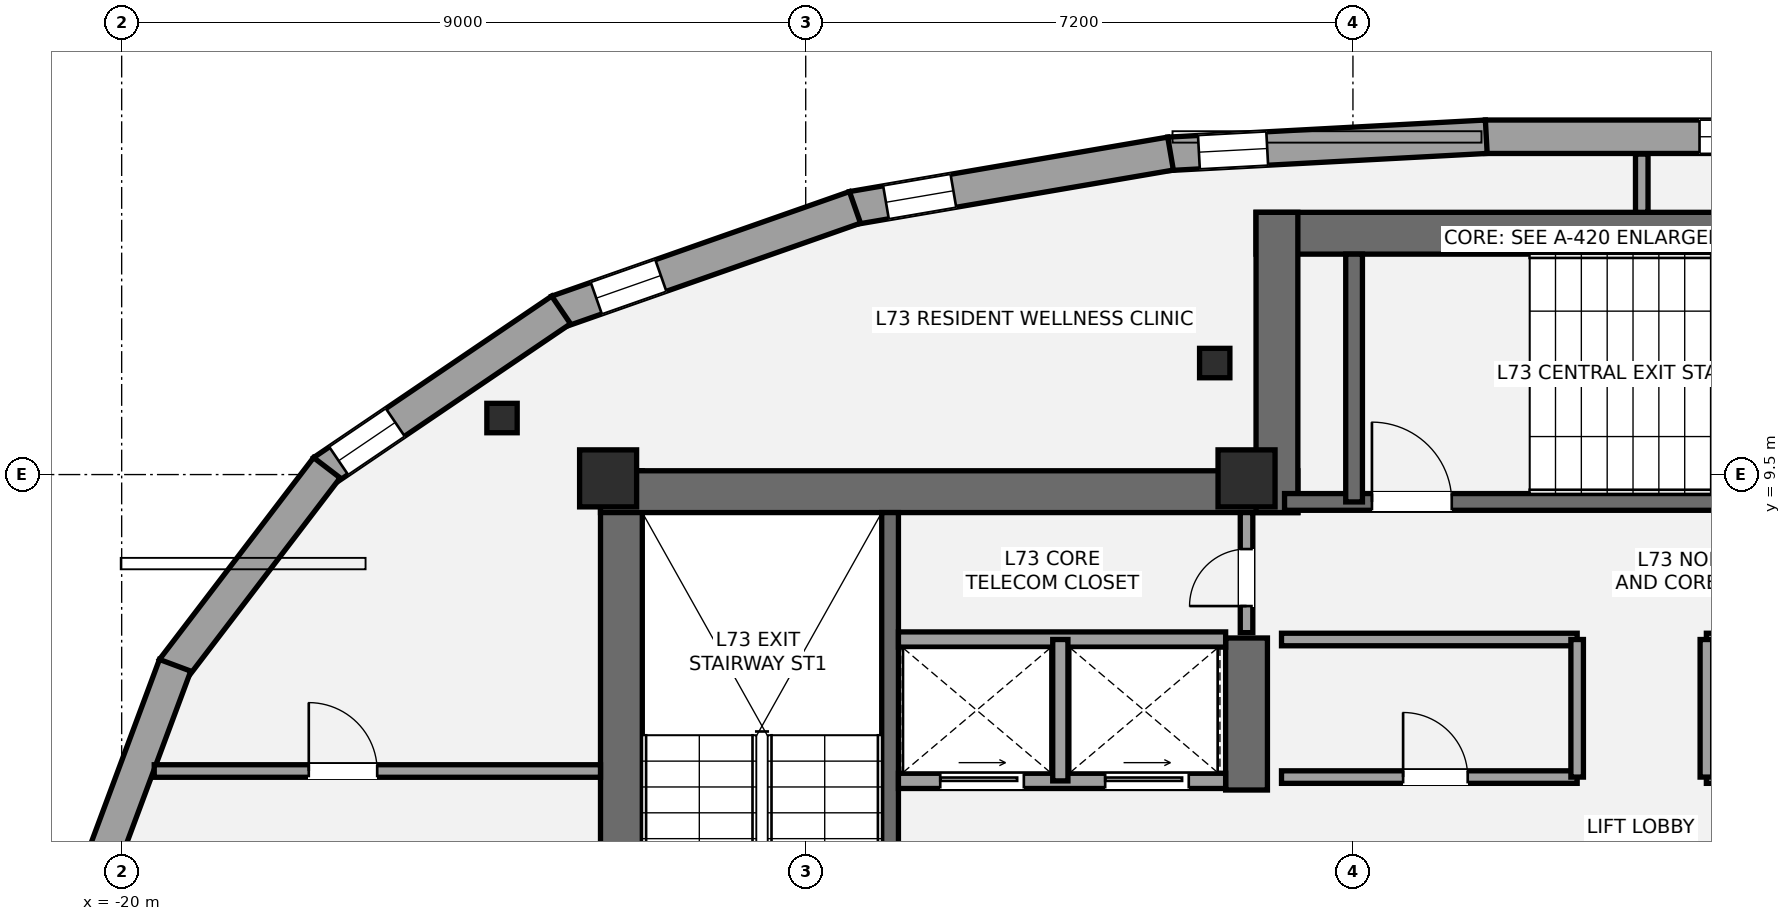
"""IFC4 building model, lengths in metres.
Left out: names, types, materials, properties, quantities, classifications, styles, units other than length and angle.
Written with IfcOpenShell. Run it as: python <this file> out.ifc"""

import sys

from ifc_helpers import new_model, si_unit, direction, frame, frame_2d, origin, origin_2d, place, context, subcontext, project, spatial, rectangle, i_section, extrude, element, fill, save


model = new_model("IFC4")
c1 = context("Model", 3, precision=1e-05, world=origin(), true_north=direction((0.0, 1.0)))
c2 = subcontext(c1, "Body", "Model", "MODEL_VIEW")
j1 = project(units=[si_unit("LENGTHUNIT", "METRE"), si_unit("PLANEANGLEUNIT", "RADIAN")], contexts=[c1])
p1 = place(None, origin())
s1 = spatial("IfcSite", under=j1, at=p1, CompositionType="ELEMENT")
p2 = place(p1, origin())
s2 = spatial("IfcBuilding", under=s1, at=p2, CompositionType="ELEMENT")
p3 = place(p2, frame((0.0, 0.0, 257.25)))
s3 = spatial("IfcBuildingStorey", under=s2, at=p3, CompositionType="ELEMENT", Elevation=257.25)
p4 = place(p3, frame((-13.425, 1.3, 0.0), z_axis=(0.0, 0.0, 1.0), x_axis=(0.0, 1.0, 0.0)))
e1 = element("IfcWall", 1, at=p4, inside=s3, PredefinedType="SHEAR", context=c2, shape_type="SweptSolid", body=[
    extrude(rectangle(XDim=8.25, YDim=0.55, at=frame_2d((4.125, 0.0))), origin(), (0.0, 0.0, 1.0), 3.15),
])
p5 = place(p3, frame((-13.7, 9.275, 0.0), z_axis=(0.0, 0.0, 1.0), x_axis=(1.0, 0.0, 0.0)))
e2 = element("IfcWall", 2, at=p5, inside=s3, PredefinedType="SHEAR", context=c2, shape_type="SweptSolid", body=[
    extrude(rectangle(XDim=9.175, YDim=0.55, at=frame_2d((4.587, 0.0))), origin(), (0.0, 0.0, 1.0), 3.15),
])
p6 = place(p3, frame((-5.2, 5.35, 0.0), z_axis=(0.0, 0.0, 1.0), x_axis=(0.0, 1.0, 0.0)))
e3 = element("IfcWall", 3, at=p6, inside=s3, PredefinedType="SHEAR", context=c2, shape_type="SweptSolid", body=[
    extrude(rectangle(XDim=2.0, YDim=0.55, at=frame_2d((1.0, 0.0))), origin(), (0.0, 0.0, 1.0), 3.15),
])
p7 = place(p3, frame((-9.89, 1.85, 0.0), z_axis=(0.0, 0.0, 1.0), x_axis=(0.0, 1.0, 0.0)))
e4 = element("IfcWall", 4, at=p7, inside=s3, PredefinedType="SHEAR", context=c2, shape_type="SweptSolid", body=[
    extrude(rectangle(XDim=7.15, YDim=0.22, at=frame_2d((3.575, 0.0))), origin(), (0.0, 0.0, 1.0), 3.15),
])
p8 = place(p3, frame((-5.075, 12.675, 0.0), z_axis=(0.0, 0.0, 1.0), x_axis=(1.0, 0.0, 0.0)))
e5 = element("IfcWall", 5, at=p8, inside=s3, PredefinedType="SHEAR", context=c2, shape_type="SweptSolid", body=[
    extrude(rectangle(XDim=10.15, YDim=0.55, at=frame_2d((5.075, 0.0))), origin(), (0.0, 0.0, 1.0), 3.15),
])
p9 = place(p3, frame((-4.8, 9.0, 0.0), z_axis=(0.0, 0.0, 1.0), x_axis=(0.0, 1.0, 0.0)))
e6 = element("IfcWall", 6, at=p9, inside=s3, PredefinedType="SHEAR", context=c2, shape_type="SweptSolid", body=[
    extrude(rectangle(XDim=3.95, YDim=0.55, at=frame_2d((1.975, 0.0))), origin(), (0.0, 0.0, 1.0), 3.15),
])
p10 = place(p3, frame((-4.7, 9.14, 0.0), z_axis=(0.0, 0.0, 1.0), x_axis=(1.0, 0.0, 0.0)))
e7 = element("IfcWall", 7, at=p10, inside=s3, PredefinedType="SHEAR", context=c2, shape_type="SweptSolid", body=[
    extrude(rectangle(XDim=9.3, YDim=0.22, at=frame_2d((4.65, 0.0))), origin(), (0.0, 0.0, 1.0), 3.15),
])
p11 = place(p10, frame((1.15, 0.0, 0.0)))
e8 = element("IfcOpeningElement", 8, at=p11, cuts=e7, PredefinedType="OPENING", context=c2, shape_type="SweptSolid", body=[
    extrude(rectangle(XDim=1.05, YDim=2.15, at=frame_2d((0.525, 1.075))), frame((0.0, 0.12, 0.0), z_axis=(0.0, -1.0, 0.0), x_axis=(1.0, 0.0, 0.0)), (0.0, 0.0, 1.0), 0.24),
])
p12 = place(p3, frame((-3.785, 9.14, 0.0), z_axis=(0.0, 0.0, 1.0), x_axis=(0.0, 1.0, 0.0)))
e9 = element("IfcWall", 9, at=p12, inside=s3, PredefinedType="SHEAR", context=c2, shape_type="SweptSolid", body=[
    extrude(rectangle(XDim=3.26, YDim=0.22, at=frame_2d((1.63, 0.0))), origin(), (0.0, 0.0, 1.0), 3.15),
])
for number, where, z_axis, x_axis in (
    (10, (-13.6, 9.45, 0.0), (0.0, 0.0, 1.0), (1.0, 0.0, 0.0)),
    (11, (-5.2, 9.45, 0.0), (0.0, 0.0, 1.0), (1.0, 0.0, 0.0)),
):
    element("IfcColumn", number, at=place(p3, frame(where, z_axis=z_axis, x_axis=x_axis)), inside=s3, PredefinedType="PILASTER", context=c2, shape_type="SweptSolid", body=[
        extrude(rectangle(XDim=0.75, YDim=0.75, at=origin_2d()), origin(), (0.0, 0.0, 1.0), 3.15),
    ])
for number, where, z_axis, x_axis in (
    (12, (-5.619, 10.967, 0.0), (0.0, 0.0, 1.0), (1.0, 0.0, 0.0)),
    (13, (-14.996, 10.244, 0.0), (0.0, 0.0, 1.0), (1.0, 0.0, 0.0)),
):
    element("IfcColumn", number, at=place(p3, frame(where, z_axis=z_axis, x_axis=x_axis)), inside=s3, PredefinedType="COLUMN", context=c2, shape_type="SweptSolid", body=[
        extrude(i_section(OverallWidth=0.399, OverallDepth=0.387, WebThickness=0.021, FlangeThickness=0.033, at=origin_2d()), origin(), (0.0, 0.0, 1.0), 3.15),
    ])
p13 = place(p3, frame((-2.058, 13.944, 0.0), z_axis=(0.0, 0.0, 1.0), x_axis=(1.0, 0.0, 0.0)))
e14 = element("IfcWall", 14, at=p13, inside=s3, PredefinedType="STANDARD", context=c2, shape_type="SweptSolid", body=[
    extrude(rectangle(XDim=4.115, YDim=0.44, at=frame_2d((2.058, 0.0))), origin(), (0.0, 0.0, 1.0), 2.296),
])
p14 = place(p13, frame((2.818, 0.0, 0.58)))
e15 = element("IfcOpeningElement", 15, at=p14, cuts=e14, PredefinedType="OPENING", context=c2, shape_type="SweptSolid", body=[
    extrude(rectangle(XDim=0.9, YDim=1.35, at=frame_2d((0.45, 0.675))), frame((0.0, 0.23, 0.0), z_axis=(0.0, -1.0, 0.0), x_axis=(1.0, 0.0, 0.0)), (0.0, 0.0, 1.0), 0.46),
])
p15 = place(p3, frame((-6.225, 13.72, 0.0), z_axis=(0.0, 0.0, 1.0), x_axis=(0.998558880418, 0.053667143941, 0.0)))
e16 = element("IfcWall", 16, at=p15, inside=s3, PredefinedType="STANDARD", context=c2, shape_type="SweptSolid", body=[
    extrude(rectangle(XDim=4.185, YDim=0.44, at=frame_2d((2.093, 0.0))), origin(), (0.0, 0.0, 1.0), 2.296),
])
p16 = place(p15, frame((0.399, 0.0, 0.58)))
e17 = element("IfcOpeningElement", 17, at=p16, cuts=e16, PredefinedType="OPENING", context=c2, shape_type="SweptSolid", body=[
    extrude(rectangle(XDim=0.9, YDim=1.35, at=frame_2d((0.45, 0.675))), frame((0.0, 0.23, 0.0), z_axis=(0.0, -1.0, 0.0), x_axis=(1.0, 0.0, 0.0)), (0.0, 0.0, 1.0), 0.46),
])
p17 = place(p3, frame((-10.388, 13.006, 0.0), z_axis=(0.0, 0.0, 1.0), x_axis=(0.985667057966, 0.168702254995, 0.0)))
e18 = element("IfcWall", 18, at=p17, inside=s3, PredefinedType="STANDARD", context=c2, shape_type="SweptSolid", body=[
    extrude(rectangle(XDim=4.249, YDim=0.44, at=frame_2d((2.125, 0.0))), origin(), (0.0, 0.0, 1.0), 2.296),
])
p18 = place(p17, frame((0.45, 0.0, 0.58)))
e19 = element("IfcOpeningElement", 19, at=p18, cuts=e18, PredefinedType="OPENING", context=c2, shape_type="SweptSolid", body=[
    extrude(rectangle(XDim=0.9, YDim=1.35, at=frame_2d((0.45, 0.675))), frame((0.0, 0.23, 0.0), z_axis=(0.0, -1.0, 0.0), x_axis=(1.0, 0.0, 0.0)), (0.0, 0.0, 1.0), 0.46),
])
p19 = place(p3, frame((-14.269, 11.64, 0.0), z_axis=(0.0, 0.0, 1.0), x_axis=(0.943571934891, 0.331167636834, 0.0)))
e20 = element("IfcWall", 20, at=p19, inside=s3, PredefinedType="STANDARD", context=c2, shape_type="SweptSolid", body=[
    extrude(rectangle(XDim=4.151, YDim=0.44, at=frame_2d((2.076, 0.0))), origin(), (0.0, 0.0, 1.0), 2.296),
])
p20 = place(p19, frame((0.544, 0.0, 0.58)))
e21 = element("IfcOpeningElement", 21, at=p20, cuts=e20, PredefinedType="OPENING", context=c2, shape_type="SweptSolid", body=[
    extrude(rectangle(XDim=0.9, YDim=1.35, at=frame_2d((0.45, 0.675))), frame((0.0, 0.23, 0.0), z_axis=(0.0, -1.0, 0.0), x_axis=(1.0, 0.0, 0.0)), (0.0, 0.0, 1.0), 0.46),
])
p21 = place(p3, frame((-17.352, 9.541, 0.0), z_axis=(0.0, 0.0, 1.0), x_axis=(0.827669406477, 0.561215959842, 0.0)))
e22 = element("IfcWall", 22, at=p21, inside=s3, PredefinedType="STANDARD", context=c2, shape_type="SweptSolid", body=[
    extrude(rectangle(XDim=3.786, YDim=0.44, at=frame_2d((1.893, 0.0))), origin(), (0.0, 0.0, 1.0), 2.296),
])
p22 = place(p21, frame((0.25, 0.0, 0.58)))
e23 = element("IfcOpeningElement", 23, at=p22, cuts=e22, PredefinedType="OPENING", context=c2, shape_type="SweptSolid", body=[
    extrude(rectangle(XDim=0.9, YDim=1.35, at=frame_2d((0.45, 0.675))), frame((0.0, 0.23, 0.0), z_axis=(0.0, -1.0, 0.0), x_axis=(1.0, 0.0, 0.0)), (0.0, 0.0, 1.0), 0.46),
])
p23 = place(p3, frame((-19.328, 6.934, 0.0), z_axis=(0.0, 0.0, 1.0), x_axis=(0.606828844818, 0.794832531479, 0.0)))
e24 = element("IfcWall", 24, at=p23, inside=s3, PredefinedType="STANDARD", context=c2, shape_type="SweptSolid", body=[
    extrude(rectangle(XDim=3.341, YDim=0.44, at=frame_2d((1.671, 0.0))), origin(), (0.0, 0.0, 1.0), 2.296),
])
p24 = place(p3, frame((-20.354, 4.152, 0.0), z_axis=(0.0, 0.0, 1.0), x_axis=(0.34898554078, 0.937128108813, 0.0)))
e25 = element("IfcWall", 25, at=p24, inside=s3, PredefinedType="STANDARD", context=c2, shape_type="SweptSolid", body=[
    extrude(rectangle(XDim=3.03, YDim=0.44, at=frame_2d((1.515, 0.0))), origin(), (0.0, 0.0, 1.0), 2.296),
])
p25 = place(p3, frame((-9.78, 5.47, 0.0), z_axis=(0.0, 0.0, 1.0), x_axis=(1.0, 0.0, 0.0)))
e26 = element("IfcWall", 26, at=p25, inside=s3, PredefinedType="SOLIDWALL", context=c2, shape_type="SweptSolid", body=[
    extrude(rectangle(XDim=4.305, YDim=0.2, at=frame_2d((2.152, 0.0))), origin(), (0.0, 0.0, 1.0), 2.93),
])
p26 = place(p25, frame((0.55, 0.0, 0.0)))
e27 = element("IfcOpeningElement", 27, at=p26, cuts=e26, PredefinedType="OPENING", context=c2, shape_type="SweptSolid", body=[
    extrude(rectangle(XDim=1.1, YDim=2.2, at=frame_2d((0.55, 1.1))), frame((0.0, 0.11, 0.0), z_axis=(0.0, -1.0, 0.0), x_axis=(1.0, 0.0, 0.0)), (0.0, 0.0, 1.0), 0.22),
])
p27 = place(p25, frame((2.72, 0.0, 0.0)))
e28 = element("IfcOpeningElement", 28, at=p27, cuts=e26, PredefinedType="OPENING", context=c2, shape_type="SweptSolid", body=[
    extrude(rectangle(XDim=1.1, YDim=2.2, at=frame_2d((0.55, 1.1))), frame((0.0, 0.11, 0.0), z_axis=(0.0, -1.0, 0.0), x_axis=(1.0, 0.0, 0.0)), (0.0, 0.0, 1.0), 0.22),
])
p28 = place(p3, frame((-9.78, 7.33, 0.0), z_axis=(0.0, 0.0, 1.0), x_axis=(1.0, 0.0, 0.0)))
e29 = element("IfcWall", 29, at=p28, inside=s3, PredefinedType="SOLIDWALL", context=c2, shape_type="SweptSolid", body=[
    extrude(rectangle(XDim=4.305, YDim=0.2, at=frame_2d((2.152, 0.0))), origin(), (0.0, 0.0, 1.0), 2.93),
])
p29 = place(p3, frame((-7.65, 5.47, 0.0), z_axis=(0.0, 0.0, 1.0), x_axis=(0.0, 1.0, 0.0)))
e30 = element("IfcWall", 30, at=p29, inside=s3, PredefinedType="SOLIDWALL", context=c2, shape_type="SweptSolid", body=[
    extrude(rectangle(XDim=1.86, YDim=0.2, at=frame_2d((0.93, 0.0))), origin(), (0.0, 0.0, 1.0), 2.93),
])
p30 = place(p3, frame((-4.74, 5.52, 0.0), z_axis=(0.0, 0.0, 1.0), x_axis=(1.0, 0.0, 0.0)))
e31 = element("IfcWall", 31, at=p30, inside=s3, PredefinedType="PARTITIONING", context=c2, shape_type="SweptSolid", body=[
    extrude(rectangle(XDim=3.89, YDim=0.165, at=frame_2d((1.945, 0.0))), origin(), (0.0, 0.0, 1.0), 2.93),
])
p31 = place(p30, frame((1.6, 0.0, 0.0)))
e32 = element("IfcOpeningElement", 32, at=p31, cuts=e31, PredefinedType="OPENING", context=c2, shape_type="SweptSolid", body=[
    extrude(rectangle(XDim=0.85, YDim=2.1, at=frame_2d((0.425, 1.05))), frame((0.0, 0.093, 0.0), z_axis=(0.0, -1.0, 0.0), x_axis=(1.0, 0.0, 0.0)), (0.0, 0.0, 1.0), 0.185),
])
p32 = place(p3, frame((-4.74, 7.33, 0.0), z_axis=(0.0, 0.0, 1.0), x_axis=(1.0, 0.0, 0.0)))
e33 = element("IfcWall", 33, at=p32, inside=s3, PredefinedType="PARTITIONING", context=c2, shape_type="SweptSolid", body=[
    extrude(rectangle(XDim=3.89, YDim=0.165, at=frame_2d((1.945, 0.0))), origin(), (0.0, 0.0, 1.0), 2.93),
])
p33 = place(p3, frame((-0.85, 5.52, 0.0), z_axis=(0.0, 0.0, 1.0), x_axis=(0.0, 1.0, 0.0)))
e34 = element("IfcWall", 34, at=p33, inside=s3, PredefinedType="PARTITIONING", context=c2, shape_type="SweptSolid", body=[
    extrude(rectangle(XDim=1.81, YDim=0.165, at=frame_2d((0.905, 0.0))), origin(), (0.0, 0.0, 1.0), 2.93),
])
p34 = place(p3, frame((0.85, 5.52, 0.0), z_axis=(0.0, 0.0, 1.0), x_axis=(1.0, 0.0, 0.0)))
e35 = element("IfcWall", 35, at=p34, inside=s3, PredefinedType="PARTITIONING", context=c2, shape_type="SweptSolid", body=[
    extrude(rectangle(XDim=3.89, YDim=0.165, at=frame_2d((1.945, 0.0))), origin(), (0.0, 0.0, 1.0), 2.93),
])
p35 = place(p34, frame((1.6, 0.0, 0.0)))
e36 = element("IfcOpeningElement", 36, at=p35, cuts=e35, PredefinedType="OPENING", context=c2, shape_type="SweptSolid", body=[
    extrude(rectangle(XDim=0.85, YDim=2.1, at=frame_2d((0.425, 1.05))), frame((0.0, 0.093, 0.0), z_axis=(0.0, -1.0, 0.0), x_axis=(1.0, 0.0, 0.0)), (0.0, 0.0, 1.0), 0.185),
])
p36 = place(p3, frame((0.85, 7.33, 0.0), z_axis=(0.0, 0.0, 1.0), x_axis=(1.0, 0.0, 0.0)))
e37 = element("IfcWall", 37, at=p36, inside=s3, PredefinedType="PARTITIONING", context=c2, shape_type="SweptSolid", body=[
    extrude(rectangle(XDim=3.89, YDim=0.165, at=frame_2d((1.945, 0.0))), origin(), (0.0, 0.0, 1.0), 2.93),
])
p37 = place(p3, frame((0.85, 5.52, 0.0), z_axis=(0.0, 0.0, 1.0), x_axis=(0.0, 1.0, 0.0)))
e38 = element("IfcWall", 38, at=p37, inside=s3, PredefinedType="PARTITIONING", context=c2, shape_type="SweptSolid", body=[
    extrude(rectangle(XDim=1.81, YDim=0.165, at=frame_2d((0.905, 0.0))), origin(), (0.0, 0.0, 1.0), 2.93),
])
p38 = place(p3, frame((-5.2, 7.42, 0.0), z_axis=(0.0, 0.0, 1.0), x_axis=(0.0, 1.0, 0.0)))
e39 = element("IfcWall", 39, at=p38, inside=s3, PredefinedType="PARTITIONING", context=c2, shape_type="SweptSolid", body=[
    extrude(rectangle(XDim=1.58, YDim=0.165, at=frame_2d((0.79, 0.0))), origin(), (0.0, 0.0, 1.0), 2.93),
])
p39 = place(p38, frame((0.35, 0.0, 0.0)))
e40 = element("IfcOpeningElement", 40, at=p39, cuts=e39, PredefinedType="OPENING", context=c2, shape_type="SweptSolid", body=[
    extrude(rectangle(XDim=0.75, YDim=2.1, at=frame_2d((0.375, 1.05))), frame((0.0, 0.093, 0.0), z_axis=(0.0, -1.0, 0.0), x_axis=(1.0, 0.0, 0.0)), (0.0, 0.0, 1.0), 0.185),
])
p40 = place(p3, frame((0.0, 12.95, 0.0), z_axis=(0.0, 0.0, 1.0), x_axis=(0.0, 1.0, 0.0)))
e41 = element("IfcWall", 41, at=p40, inside=s3, PredefinedType="PARTITIONING", context=c2, shape_type="SweptSolid", body=[
    extrude(rectangle(XDim=0.766, YDim=0.165, at=frame_2d((0.383, 0.0))), origin(), (0.0, 0.0, 1.0), 2.93),
])
p41 = place(p3, frame((-19.572, 5.6, 0.0), z_axis=(0.0, 0.0, 1.0), x_axis=(1.0, 0.0, 0.0)))
e42 = element("IfcWall", 42, at=p41, inside=s3, PredefinedType="PARTITIONING", context=c2, shape_type="SweptSolid", body=[
    extrude(rectangle(XDim=5.872, YDim=0.165, at=frame_2d((2.936, 0.0))), origin(), (0.0, 0.0, 1.0), 2.383),
])
p42 = place(p41, frame((2.033, 0.0, 0.0)))
e43 = element("IfcOpeningElement", 43, at=p42, cuts=e42, PredefinedType="OPENING", context=c2, shape_type="SweptSolid", body=[
    extrude(rectangle(XDim=0.9, YDim=2.1, at=frame_2d((0.45, 1.05))), frame((0.0, 0.093, 0.0), z_axis=(0.0, -1.0, 0.0), x_axis=(1.0, 0.0, 0.0)), (0.0, 0.0, 1.0), 0.185),
])
p43 = place(p14, origin())
e44 = element("IfcWindow", 44, at=p43, inside=s3, PartitioningType="SINGLE_PANEL", PredefinedType="WINDOW", context=c2, shape_type="SweptSolid", body=[
    extrude(rectangle(XDim=0.9, YDim=1.35, at=frame_2d((0.45, 0.675))), frame((0.0, -0.01, 0.0), z_axis=(0.0, -1.0, 0.0), x_axis=(1.0, 0.0, 0.0)), (0.0, 0.0, 1.0), 0.06),
])
fill(e15, e44)
p44 = place(p16, origin())
e45 = element("IfcWindow", 45, at=p44, inside=s3, PartitioningType="SINGLE_PANEL", PredefinedType="WINDOW", context=c2, shape_type="SweptSolid", body=[
    extrude(rectangle(XDim=0.9, YDim=1.35, at=frame_2d((0.45, 0.675))), frame((0.0, -0.01, 0.0), z_axis=(0.0, -1.0, 0.0), x_axis=(1.0, 0.0, 0.0)), (0.0, 0.0, 1.0), 0.06),
])
fill(e17, e45)
p45 = place(p18, origin())
e46 = element("IfcWindow", 46, at=p45, inside=s3, PartitioningType="SINGLE_PANEL", PredefinedType="WINDOW", context=c2, shape_type="SweptSolid", body=[
    extrude(rectangle(XDim=0.9, YDim=1.35, at=frame_2d((0.45, 0.675))), frame((0.0, -0.01, 0.0), z_axis=(0.0, -1.0, 0.0), x_axis=(1.0, 0.0, 0.0)), (0.0, 0.0, 1.0), 0.06),
])
fill(e19, e46)
p46 = place(p20, origin())
e47 = element("IfcWindow", 47, at=p46, inside=s3, PartitioningType="SINGLE_PANEL", PredefinedType="WINDOW", context=c2, shape_type="SweptSolid", body=[
    extrude(rectangle(XDim=0.9, YDim=1.35, at=frame_2d((0.45, 0.675))), frame((0.0, -0.01, 0.0), z_axis=(0.0, -1.0, 0.0), x_axis=(1.0, 0.0, 0.0)), (0.0, 0.0, 1.0), 0.06),
])
fill(e21, e47)
p47 = place(p22, origin())
e48 = element("IfcWindow", 48, at=p47, inside=s3, PartitioningType="SINGLE_PANEL", PredefinedType="WINDOW", context=c2, shape_type="SweptSolid", body=[
    extrude(rectangle(XDim=0.9, YDim=1.35, at=frame_2d((0.45, 0.675))), frame((0.0, -0.01, 0.0), z_axis=(0.0, -1.0, 0.0), x_axis=(1.0, 0.0, 0.0)), (0.0, 0.0, 1.0), 0.06),
])
fill(e23, e48)
p48 = place(p11, origin())
e49 = element("IfcDoor", 49, at=p48, inside=s3, OperationType="SINGLE_SWING_LEFT", PredefinedType="DOOR", context=c2, shape_type="SweptSolid", body=[
    extrude(rectangle(XDim=1.05, YDim=2.15, at=frame_2d((0.525, 1.075))), frame((0.0, 0.025, 0.0), z_axis=(0.0, -1.0, 0.0), x_axis=(1.0, 0.0, 0.0)), (0.0, 0.0, 1.0), 0.05),
])
fill(e8, e49)
p49 = place(p26, origin())
e50 = element("IfcDoor", 50, at=p49, inside=s3, OperationType="SLIDING_TO_LEFT", PredefinedType="DOOR", context=c2, shape_type="SweptSolid", body=[
    extrude(rectangle(XDim=1.1, YDim=2.2, at=frame_2d((0.55, 1.1))), frame((0.0, 0.025, 0.0), z_axis=(0.0, -1.0, 0.0), x_axis=(1.0, 0.0, 0.0)), (0.0, 0.0, 1.0), 0.05),
])
fill(e27, e50)
p50 = place(p27, origin())
e51 = element("IfcDoor", 51, at=p50, inside=s3, OperationType="SLIDING_TO_LEFT", PredefinedType="DOOR", context=c2, shape_type="SweptSolid", body=[
    extrude(rectangle(XDim=1.1, YDim=2.2, at=frame_2d((0.55, 1.1))), frame((0.0, 0.025, 0.0), z_axis=(0.0, -1.0, 0.0), x_axis=(1.0, 0.0, 0.0)), (0.0, 0.0, 1.0), 0.05),
])
fill(e28, e51)
p51 = place(p31, origin())
e52 = element("IfcDoor", 52, at=p51, inside=s3, OperationType="SINGLE_SWING_LEFT", PredefinedType="DOOR", context=c2, shape_type="SweptSolid", body=[
    extrude(rectangle(XDim=0.85, YDim=2.1, at=frame_2d((0.425, 1.05))), frame((0.0, 0.025, 0.0), z_axis=(0.0, -1.0, 0.0), x_axis=(1.0, 0.0, 0.0)), (0.0, 0.0, 1.0), 0.05),
])
fill(e32, e52)
p52 = place(p39, origin())
e53 = element("IfcDoor", 53, at=p52, inside=s3, OperationType="SINGLE_SWING_LEFT", PredefinedType="DOOR", context=c2, shape_type="SweptSolid", body=[
    extrude(rectangle(XDim=0.75, YDim=2.1, at=frame_2d((0.375, 1.05))), frame((0.0, 0.025, 0.0), z_axis=(0.0, -1.0, 0.0), x_axis=(1.0, 0.0, 0.0)), (0.0, 0.0, 1.0), 0.05),
])
fill(e40, e53)
p53 = place(p42, origin())
e54 = element("IfcDoor", 54, at=p53, inside=s3, OperationType="SINGLE_SWING_LEFT", PredefinedType="DOOR", context=c2, shape_type="SweptSolid", body=[
    extrude(rectangle(XDim=0.9, YDim=2.1, at=frame_2d((0.45, 1.05))), frame((0.0, 0.025, 0.0), z_axis=(0.0, -1.0, 0.0), x_axis=(1.0, 0.0, 0.0)), (0.0, 0.0, 1.0), 0.05),
])
fill(e43, e54)
save(model, sys.argv[1])
